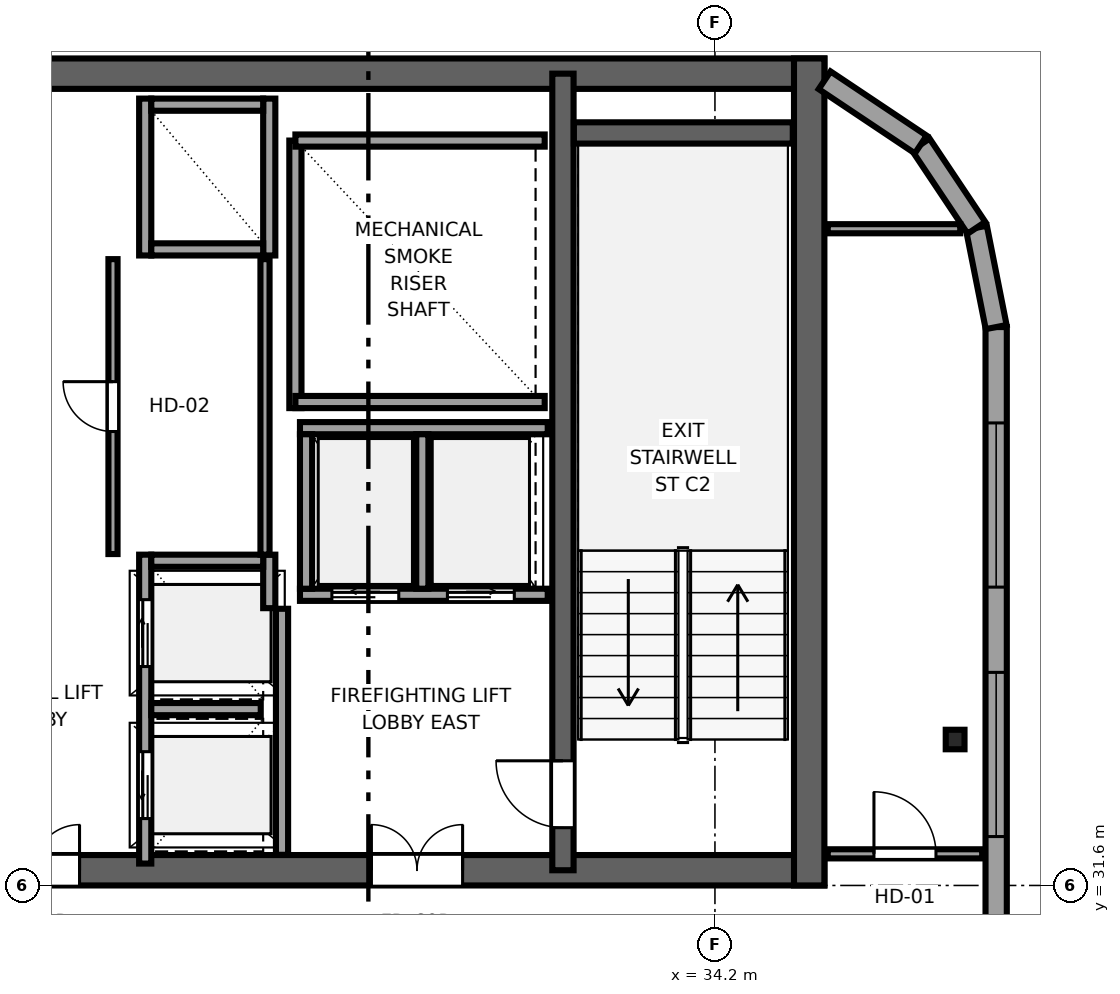
"""IFC4 building model, lengths in metres.
Left out: names, types, materials, properties, quantities, classifications, styles, units other than length and angle.
Written with IfcOpenShell. Run it as: python <this file> out.ifc"""

import sys

from ifc_helpers import new_model, si_unit, direction, frame, frame_2d, origin, origin_2d, place, context, subcontext, project, spatial, rectangle, i_section, extrude, source, transform, mapped, element, fill, save


model = new_model("IFC4")
c1 = context("Model", 3, precision=1e-05, world=origin(), true_north=direction((0.0, 1.0)))
c2 = subcontext(c1, "Body", "Model", "MODEL_VIEW")
j1 = project(units=[si_unit("LENGTHUNIT", "METRE"), si_unit("PLANEANGLEUNIT", "RADIAN")], contexts=[c1])
p1 = place(None, origin())
s1 = spatial("IfcSite", under=j1, at=p1, CompositionType="ELEMENT")
p2 = place(p1, origin())
s2 = spatial("IfcBuilding", under=s1, at=p2, CompositionType="ELEMENT")
p3 = place(p2, frame((0.0, 0.0, 248.75)))
s3 = spatial("IfcBuildingStorey", under=s2, at=p3, CompositionType="ELEMENT", Elevation=248.75)
p4 = place(p3, frame((10.0, 31.85, 0.0), z_axis=(0.0, 0.0, 1.0), x_axis=(1.0, 0.0, 0.0)))
e1 = element("IfcWall", 1, at=p4, inside=s3, PredefinedType="SHEAR", context=c2, shape_type="SweptSolid", body=[
    extrude(rectangle(XDim=26.0, YDim=0.5, at=frame_2d((13.0, 0.0))), origin(), (0.0, 0.0, 1.0), 3.55),
])
p5 = place(p4, frame((7.45, 0.0, 0.0), z_axis=(0.0, 0.0, 1.0), x_axis=(-1.0, 0.0, 0.0)))
e2 = element("IfcOpeningElement", 2, at=p5, cuts=e1, PredefinedType="OPENING", context=c2, shape_type="SweptSolid", body=[
    extrude(rectangle(XDim=1.5, YDim=2.04, at=frame_2d((0.75, 1.02))), frame((0.0, 0.26, 0.0), z_axis=(0.0, -1.0, 0.0), x_axis=(1.0, 0.0, 0.0)), (0.0, 0.0, 1.0), 0.52),
])
p6 = place(p4, frame((13.75, 0.0, 0.0), z_axis=(0.0, 0.0, 1.0), x_axis=(-1.0, 0.0, 0.0)))
e3 = element("IfcOpeningElement", 3, at=p6, cuts=e1, PredefinedType="OPENING", context=c2, shape_type="SweptSolid", body=[
    extrude(rectangle(XDim=1.5, YDim=2.04, at=frame_2d((0.75, 1.02))), frame((0.0, 0.26, 0.0), z_axis=(0.0, -1.0, 0.0), x_axis=(1.0, 0.0, 0.0)), (0.0, 0.0, 1.0), 0.52),
])
p7 = place(p4, frame((20.05, 0.0, 0.0), z_axis=(0.0, 0.0, 1.0), x_axis=(-1.0, 0.0, 0.0)))
e4 = element("IfcOpeningElement", 4, at=p7, cuts=e1, PredefinedType="OPENING", context=c2, shape_type="SweptSolid", body=[
    extrude(rectangle(XDim=1.5, YDim=2.04, at=frame_2d((0.75, 1.02))), frame((0.0, 0.26, 0.0), z_axis=(0.0, -1.0, 0.0), x_axis=(1.0, 0.0, 0.0)), (0.0, 0.0, 1.0), 0.52),
])
p8 = place(p3, frame((10.0, 44.95, 0.0), z_axis=(0.0, 0.0, 1.0), x_axis=(1.0, 0.0, 0.0)))
e5 = element("IfcWall", 5, at=p8, inside=s3, PredefinedType="SHEAR", context=c2, shape_type="SweptSolid", body=[
    extrude(rectangle(XDim=26.0, YDim=0.5, at=frame_2d((13.0, 0.0))), origin(), (0.0, 0.0, 1.0), 3.55),
])
p9 = place(p3, frame((35.75, 31.6, 0.0), z_axis=(0.0, 0.0, 1.0), x_axis=(0.0, 1.0, 0.0)))
e6 = element("IfcWall", 6, at=p9, inside=s3, PredefinedType="SHEAR", context=c2, shape_type="SweptSolid", body=[
    extrude(rectangle(XDim=13.6, YDim=0.5, at=frame_2d((6.8, 0.0))), origin(), (0.0, 0.0, 1.0), 3.55),
])
p10 = place(p3, frame((31.7, 31.85, 0.0), z_axis=(0.0, 0.0, 1.0), x_axis=(0.0, 1.0, 0.0)))
e7 = element("IfcWall", 7, at=p10, inside=s3, PredefinedType="SHEAR", context=c2, shape_type="SweptSolid", body=[
    extrude(rectangle(XDim=13.1, YDim=0.35, at=frame_2d((6.55, 0.0))), origin(), (0.0, 0.0, 1.0), 3.55),
])
p11 = place(p10, frame((1.8, 0.0, 0.0), z_axis=(0.0, 0.0, 1.0), x_axis=(-1.0, 0.0, 0.0)))
e8 = element("IfcOpeningElement", 8, at=p11, cuts=e7, PredefinedType="OPENING", context=c2, shape_type="SweptSolid", body=[
    extrude(rectangle(XDim=1.1, YDim=2.12, at=frame_2d((0.55, 1.06))), frame((0.0, 0.185, 0.0), z_axis=(0.0, -1.0, 0.0), x_axis=(1.0, 0.0, 0.0)), (0.0, 0.0, 1.0), 0.37),
])
p12 = place(p3, frame((31.88, 43.975, 0.0), z_axis=(0.0, 0.0, 1.0), x_axis=(1.0, 0.0, 0.0)))
e9 = element("IfcWall", 9, at=p12, inside=s3, PredefinedType="SHEAR", context=c2, shape_type="SweptSolid", body=[
    extrude(rectangle(XDim=3.6, YDim=0.35, at=frame_2d((1.8, 0.0))), origin(), (0.0, 0.0, 1.0), 3.55),
])
m1 = source(origin(), c2, "Body", "SweptSolid", [
    extrude(i_section(OverallWidth=0.309, OverallDepth=0.321, WebThickness=0.014, FlangeThickness=0.022, FilletRadius=0.017, at=origin_2d()), origin(), (0.0, 0.0, 1.0), 3.55),
])
p13 = place(p3, frame((38.15, 34.0, 0.0), z_axis=(0.0, 0.0, 1.0), x_axis=(1.0, 0.0, 0.0)))
e10 = element("IfcColumn", 10, at=p13, inside=s3, PredefinedType="COLUMN", context=c2, shape_type="MappedRepresentation", body=[
    mapped(m1, transform((0.0, 0.0, 0.0), x_axis=(1.0, 0.0, 0.0), y_axis=(0.0, 1.0, 0.0), z_axis=(0.0, 0.0, 1.0), scale=1.0)),
])
p14 = place(p3, frame((38.825, 7.017, 0.0), z_axis=(0.0, 0.0, 1.0), x_axis=(0.0, 1.0, 0.0)))
e11 = element("IfcWall", 11, at=p14, inside=s3, PredefinedType="SOLIDWALL", context=c2, shape_type="SweptSolid", body=[
    extrude(rectangle(XDim=33.766, YDim=0.35, at=frame_2d((16.883, 0.0))), origin(), (0.0, 0.0, 1.0), 3.37),
])
p15 = place(p14, frame((1.576, 0.0, 0.68)))
e12 = element("IfcOpeningElement", 12, at=p15, cuts=e11, PredefinedType="OPENING", context=c2, shape_type="SweptSolid", body=[
    extrude(rectangle(XDim=2.7, YDim=1.95, at=frame_2d((1.35, 0.975))), frame((0.0, 0.185, 0.0), z_axis=(0.0, -1.0, 0.0), x_axis=(1.0, 0.0, 0.0)), (0.0, 0.0, 1.0), 0.37),
])
p16 = place(p14, frame((6.228, 0.0, 0.68)))
e13 = element("IfcOpeningElement", 13, at=p16, cuts=e11, PredefinedType="OPENING", context=c2, shape_type="SweptSolid", body=[
    extrude(rectangle(XDim=2.7, YDim=1.95, at=frame_2d((1.35, 0.975))), frame((0.0, 0.185, 0.0), z_axis=(0.0, -1.0, 0.0), x_axis=(1.0, 0.0, 0.0)), (0.0, 0.0, 1.0), 0.37),
])
p17 = place(p14, frame((10.881, 0.0, 0.68)))
e14 = element("IfcOpeningElement", 14, at=p17, cuts=e11, PredefinedType="OPENING", context=c2, shape_type="SweptSolid", body=[
    extrude(rectangle(XDim=2.7, YDim=1.95, at=frame_2d((1.35, 0.975))), frame((0.0, 0.185, 0.0), z_axis=(0.0, -1.0, 0.0), x_axis=(1.0, 0.0, 0.0)), (0.0, 0.0, 1.0), 0.37),
])
p18 = place(p14, frame((15.533, 0.0, 0.68)))
e15 = element("IfcOpeningElement", 15, at=p18, cuts=e11, PredefinedType="OPENING", context=c2, shape_type="SweptSolid", body=[
    extrude(rectangle(XDim=2.7, YDim=1.95, at=frame_2d((1.35, 0.975))), frame((0.0, 0.185, 0.0), z_axis=(0.0, -1.0, 0.0), x_axis=(1.0, 0.0, 0.0)), (0.0, 0.0, 1.0), 0.37),
])
p19 = place(p14, frame((19.635, 0.0, 0.68)))
e16 = element("IfcOpeningElement", 16, at=p19, cuts=e11, PredefinedType="OPENING", context=c2, shape_type="SweptSolid", body=[
    extrude(rectangle(XDim=2.7, YDim=1.95, at=frame_2d((1.35, 0.975))), frame((0.0, 0.185, 0.0), z_axis=(0.0, -1.0, 0.0), x_axis=(1.0, 0.0, 0.0)), (0.0, 0.0, 1.0), 0.37),
])
p20 = place(p14, frame((25.387, 0.0, 0.68)))
e17 = element("IfcOpeningElement", 17, at=p20, cuts=e11, PredefinedType="OPENING", context=c2, shape_type="SweptSolid", body=[
    extrude(rectangle(XDim=2.7, YDim=1.95, at=frame_2d((1.35, 0.975))), frame((0.0, 0.185, 0.0), z_axis=(0.0, -1.0, 0.0), x_axis=(1.0, 0.0, 0.0)), (0.0, 0.0, 1.0), 0.37),
])
p21 = place(p14, frame((29.489, 0.0, 0.68)))
e18 = element("IfcOpeningElement", 18, at=p21, cuts=e11, PredefinedType="OPENING", context=c2, shape_type="SweptSolid", body=[
    extrude(rectangle(XDim=2.7, YDim=1.95, at=frame_2d((1.35, 0.975))), frame((0.0, 0.185, 0.0), z_axis=(0.0, -1.0, 0.0), x_axis=(1.0, 0.0, 0.0)), (0.0, 0.0, 1.0), 0.37),
])
p22 = place(p3, frame((38.825, 40.783, 0.0), z_axis=(0.0, 0.0, 1.0), x_axis=(-0.195044345786, 0.980794424524, 0.0)))
e19 = element("IfcWall", 19, at=p22, inside=s3, PredefinedType="SOLIDWALL", context=c2, shape_type="SweptSolid", body=[
    extrude(rectangle(XDim=1.665, YDim=0.35, at=frame_2d((0.833, 0.0))), origin(), (0.0, 0.0, 1.0), 3.37),
])
p23 = place(p3, frame((38.5, 42.416, 0.0), z_axis=(0.0, 0.0, 1.0), x_axis=(-0.555520825599, 0.831502623162, 0.0)))
e20 = element("IfcWall", 20, at=p23, inside=s3, PredefinedType="SOLIDWALL", context=c2, shape_type="SweptSolid", body=[
    extrude(rectangle(XDim=1.647, YDim=0.35, at=frame_2d((0.824, 0.0))), origin(), (0.0, 0.0, 1.0), 3.37),
])
p24 = place(p3, frame((37.585, 43.785, 0.0), z_axis=(0.0, 0.0, 1.0), x_axis=(-0.831516639465, 0.555499845448, 0.0)))
e21 = element("IfcWall", 21, at=p24, inside=s3, PredefinedType="SOLIDWALL", context=c2, shape_type="SweptSolid", body=[
    extrude(rectangle(XDim=1.902, YDim=0.35, at=frame_2d((0.951, 0.0))), origin(), (0.0, 0.0, 1.0), 3.37),
])
p25 = place(p3, frame((27.3, 39.45, 0.0), z_axis=(0.0, 0.0, 1.0), x_axis=(0.0, 1.0, 0.0)))
e22 = element("IfcWall", 22, at=p25, inside=s3, PredefinedType="SOLIDWALL", context=c2, shape_type="SweptSolid", body=[
    extrude(rectangle(XDim=4.4, YDim=0.2, at=frame_2d((2.2, 0.0))), origin(), (0.0, 0.0, 1.0), 3.37),
])
for number, where, z_axis, x_axis in (
    (23, (27.3, 39.55, 0.0), (0.0, 0.0, 1.0), (1.0, 0.0, 0.0)),
    (24, (27.3, 43.85, 0.0), (0.0, 0.0, 1.0), (1.0, 0.0, 0.0)),
):
    element("IfcWall", number, at=place(p3, frame(where, z_axis=z_axis, x_axis=x_axis)), inside=s3, PredefinedType="SOLIDWALL", context=c2, shape_type="SweptSolid", body=[
        extrude(rectangle(XDim=4.1, YDim=0.2, at=frame_2d((2.05, 0.0))), origin(), (0.0, 0.0, 1.0), 3.37),
    ])
p26 = place(p3, frame((27.08, 32.104, 0.0), z_axis=(0.0, 0.0, 1.0), x_axis=(0.0, 1.0, 0.0)))
e25 = element("IfcWall", 25, at=p26, inside=s3, PredefinedType="SOLIDWALL", context=c2, shape_type="SweptSolid", body=[
    extrude(rectangle(XDim=4.046, YDim=0.2, at=frame_2d((2.023, 0.0))), origin(), (0.0, 0.0, 1.0), 3.37),
])
p27 = place(p3, frame((27.375, 36.38, 0.0), z_axis=(0.0, 0.0, 1.0), x_axis=(1.0, 0.0, 0.0)))
e26 = element("IfcWall", 26, at=p27, inside=s3, PredefinedType="SOLIDWALL", context=c2, shape_type="SweptSolid", body=[
    extrude(rectangle(XDim=4.075, YDim=0.2, at=frame_2d((2.038, 0.0))), origin(), (0.0, 0.0, 1.0), 3.37),
])
p28 = place(p27, frame((0.525, 0.0, 0.0)))
e27 = element("IfcOpeningElement", 27, at=p28, cuts=e26, PredefinedType="OPENING", context=c2, shape_type="SweptSolid", body=[
    extrude(rectangle(XDim=1.1, YDim=2.12, at=frame_2d((0.55, 1.06))), frame((0.0, 0.11, 0.0), z_axis=(0.0, -1.0, 0.0), x_axis=(1.0, 0.0, 0.0)), (0.0, 0.0, 1.0), 0.22),
])
p29 = place(p27, frame((2.425, 0.0, 0.0)))
e28 = element("IfcOpeningElement", 28, at=p29, cuts=e26, PredefinedType="OPENING", context=c2, shape_type="SweptSolid", body=[
    extrude(rectangle(XDim=1.1, YDim=2.12, at=frame_2d((0.55, 1.06))), frame((0.0, 0.11, 0.0), z_axis=(0.0, -1.0, 0.0), x_axis=(1.0, 0.0, 0.0)), (0.0, 0.0, 1.0), 0.22),
])
p30 = place(p3, frame((27.375, 39.12, 0.0), z_axis=(0.0, 0.0, 1.0), x_axis=(1.0, 0.0, 0.0)))
e29 = element("IfcWall", 29, at=p30, inside=s3, PredefinedType="SOLIDWALL", context=c2, shape_type="SweptSolid", body=[
    extrude(rectangle(XDim=4.075, YDim=0.2, at=frame_2d((2.038, 0.0))), origin(), (0.0, 0.0, 1.0), 3.37),
])
for number, where, z_axis, x_axis in (
    (30, (27.475, 36.48, 0.0), (0.0, 0.0, 1.0), (0.0, 1.0, 0.0)),
    (31, (29.387, 36.48, 0.0), (0.0, 0.0, 1.0), (0.0, 1.0, 0.0)),
):
    element("IfcWall", number, at=place(p3, frame(where, z_axis=z_axis, x_axis=x_axis)), inside=s3, PredefinedType="SOLIDWALL", context=c2, shape_type="SweptSolid", body=[
        extrude(rectangle(XDim=2.54, YDim=0.2, at=frame_2d((1.27, 0.0))), origin(), (0.0, 0.0, 1.0), 3.37),
    ])
p31 = place(p3, frame((24.83, 31.96, 0.0), z_axis=(0.0, 0.0, 1.0), x_axis=(0.0, 1.0, 0.0)))
e32 = element("IfcWall", 32, at=p31, inside=s3, PredefinedType="SOLIDWALL", context=c2, shape_type="SweptSolid", body=[
    extrude(rectangle(XDim=5.08, YDim=0.2, at=frame_2d((2.54, 0.0))), origin(), (0.0, 0.0, 1.0), 3.37),
])
p32 = place(p31, frame((0.74, 0.0, 0.0)))
e33 = element("IfcOpeningElement", 33, at=p32, cuts=e32, PredefinedType="OPENING", context=c2, shape_type="SweptSolid", body=[
    extrude(rectangle(XDim=1.1, YDim=2.12, at=frame_2d((0.55, 1.06))), frame((0.0, 0.11, 0.0), z_axis=(0.0, -1.0, 0.0), x_axis=(1.0, 0.0, 0.0)), (0.0, 0.0, 1.0), 0.22),
])
p33 = place(p31, frame((3.24, 0.0, 0.0)))
e34 = element("IfcOpeningElement", 34, at=p33, cuts=e32, PredefinedType="OPENING", context=c2, shape_type="SweptSolid", body=[
    extrude(rectangle(XDim=1.1, YDim=2.12, at=frame_2d((0.55, 1.06))), frame((0.0, 0.11, 0.0), z_axis=(0.0, -1.0, 0.0), x_axis=(1.0, 0.0, 0.0)), (0.0, 0.0, 1.0), 0.22),
])
p34 = place(p3, frame((26.87, 36.16, 0.0), z_axis=(0.0, 0.0, 1.0), x_axis=(0.0, 1.0, 0.0)))
e35 = element("IfcWall", 35, at=p34, inside=s3, PredefinedType="SOLIDWALL", context=c2, shape_type="SweptSolid", body=[
    extrude(rectangle(XDim=0.88, YDim=0.2, at=frame_2d((0.44, 0.0))), origin(), (0.0, 0.0, 1.0), 3.37),
])
p35 = place(p3, frame((24.93, 36.94, 0.0), z_axis=(0.0, 0.0, 1.0), x_axis=(1.0, 0.0, 0.0)))
e36 = element("IfcWall", 36, at=p35, inside=s3, PredefinedType="SOLIDWALL", context=c2, shape_type="SweptSolid", body=[
    extrude(rectangle(XDim=1.84, YDim=0.2, at=frame_2d((0.92, 0.0))), origin(), (0.0, 0.0, 1.0), 3.37),
])
p36 = place(p3, frame((24.93, 34.5, 0.0), z_axis=(0.0, 0.0, 1.0), x_axis=(1.0, 0.0, 0.0)))
e37 = element("IfcWall", 37, at=p36, inside=s3, PredefinedType="SOLIDWALL", context=c2, shape_type="SweptSolid", body=[
    extrude(rectangle(XDim=1.8, YDim=0.2, at=frame_2d((0.9, 0.0))), origin(), (0.0, 0.0, 1.0), 3.37),
])
for number, where, z_axis, x_axis in (
    (38, (24.83, 41.96, 0.0), (0.0, 0.0, 1.0), (0.0, 1.0, 0.0)),
    (39, (26.87, 41.96, 0.0), (0.0, 0.0, 1.0), (0.0, 1.0, 0.0)),
):
    element("IfcWall", number, at=place(p3, frame(where, z_axis=z_axis, x_axis=x_axis)), inside=s3, PredefinedType="SOLIDWALL", context=c2, shape_type="SweptSolid", body=[
        extrude(rectangle(XDim=2.58, YDim=0.2, at=frame_2d((1.29, 0.0))), origin(), (0.0, 0.0, 1.0), 3.37),
    ])
for number, where, z_axis, x_axis in (
    (40, (24.93, 42.06, 0.0), (0.0, 0.0, 1.0), (1.0, 0.0, 0.0)),
    (41, (24.93, 44.44, 0.0), (0.0, 0.0, 1.0), (1.0, 0.0, 0.0)),
):
    element("IfcWall", number, at=place(p3, frame(where, z_axis=z_axis, x_axis=x_axis)), inside=s3, PredefinedType="SOLIDWALL", context=c2, shape_type="SweptSolid", body=[
        extrude(rectangle(XDim=1.84, YDim=0.2, at=frame_2d((0.92, 0.0))), origin(), (0.0, 0.0, 1.0), 3.37),
    ])
p37 = place(p3, frame((24.3, 37.05, 0.0), z_axis=(0.0, 0.0, 1.0), x_axis=(0.0, 1.0, 0.0)))
e42 = element("IfcWall", 42, at=p37, inside=s3, PredefinedType="PARTITIONING", context=c2, shape_type="SweptSolid", body=[
    extrude(rectangle(XDim=4.85, YDim=0.15, at=frame_2d((2.425, 0.0))), origin(), (0.0, 0.0, 1.0), 3.37),
])
p38 = place(p37, frame((2.015, 0.0, 0.0)))
e43 = element("IfcOpeningElement", 43, at=p38, cuts=e42, PredefinedType="OPENING", context=c2, shape_type="SweptSolid", body=[
    extrude(rectangle(XDim=0.82, YDim=2.01, at=frame_2d((0.41, 1.005))), frame((0.0, 0.085, 0.0), z_axis=(0.0, -1.0, 0.0), x_axis=(1.0, 0.0, 0.0)), (0.0, 0.0, 1.0), 0.17),
])
p39 = place(p3, frame((26.8, 37.04, 0.0), z_axis=(0.0, 0.0, 1.0), x_axis=(0.0, 1.0, 0.0)))
e44 = element("IfcWall", 44, at=p39, inside=s3, PredefinedType="PARTITIONING", context=c2, shape_type="SweptSolid", body=[
    extrude(rectangle(XDim=4.86, YDim=0.15, at=frame_2d((2.43, 0.0))), origin(), (0.0, 0.0, 1.0), 3.37),
])
p40 = place(p3, frame((36.055, 32.12, 0.0), z_axis=(0.0, 0.0, 1.0), x_axis=(1.0, 0.0, 0.0)))
e45 = element("IfcWall", 45, at=p40, inside=s3, PredefinedType="PARTITIONING", context=c2, shape_type="SweptSolid", body=[
    extrude(rectangle(XDim=2.54, YDim=0.15, at=frame_2d((1.27, 0.0))), origin(), (0.0, 0.0, 1.0), 3.37),
])
p41 = place(p40, frame((0.76, 0.0, 0.0)))
e46 = element("IfcOpeningElement", 46, at=p41, cuts=e45, PredefinedType="OPENING", context=c2, shape_type="SweptSolid", body=[
    extrude(rectangle(XDim=1.02, YDim=2.03, at=frame_2d((0.51, 1.015))), frame((0.0, 0.085, 0.0), z_axis=(0.0, -1.0, 0.0), x_axis=(1.0, 0.0, 0.0)), (0.0, 0.0, 1.0), 0.17),
])
p42 = place(p3, frame((36.055, 42.4, 0.0), z_axis=(0.0, 0.0, 1.0), x_axis=(1.0, 0.0, 0.0)))
e47 = element("IfcWall", 47, at=p42, inside=s3, PredefinedType="PARTITIONING", context=c2, shape_type="SweptSolid", body=[
    extrude(rectangle(XDim=2.179, YDim=0.15, at=frame_2d((1.089, 0.0))), origin(), (0.0, 0.0, 1.0), 3.37),
])
m2 = source(origin(), c2, "Body", "SweptSolid", [
    extrude(rectangle(XDim=2.7, YDim=1.95, at=frame_2d((1.35, 0.975))), frame((0.0, 0.09, 0.0), z_axis=(0.0, -1.0, 0.0), x_axis=(1.0, 0.0, 0.0)), (0.0, 0.0, 1.0), 0.06),
])
p43 = place(p20, origin())
e48 = element("IfcWindow", 48, at=p43, inside=s3, PartitioningType="TRIPLE_PANEL_HORIZONTAL", PredefinedType="WINDOW", context=c2, shape_type="MappedRepresentation", body=[
    mapped(m2, transform((0.0, 0.0, 0.0), x_axis=(1.0, 0.0, 0.0), y_axis=(0.0, 1.0, 0.0), z_axis=(0.0, 0.0, 1.0), scale=1.0)),
])
fill(e17, e48)
p44 = place(p21, origin())
e49 = element("IfcWindow", 49, at=p44, inside=s3, PartitioningType="TRIPLE_PANEL_HORIZONTAL", PredefinedType="WINDOW", context=c2, shape_type="MappedRepresentation", body=[
    mapped(m2, transform((0.0, 0.0, 0.0), x_axis=(1.0, 0.0, 0.0), y_axis=(0.0, 1.0, 0.0), z_axis=(0.0, 0.0, 1.0), scale=1.0)),
])
fill(e18, e49)
m3 = source(origin(), c2, "Body", "SweptSolid", [
    extrude(rectangle(XDim=1.1, YDim=2.12, at=frame_2d((0.55, 1.06))), frame((0.0, 0.025, 0.0), z_axis=(0.0, -1.0, 0.0), x_axis=(1.0, 0.0, 0.0)), (0.0, 0.0, 1.0), 0.05),
])
p45 = place(p11, origin())
e50 = element("IfcDoor", 50, at=p45, inside=s3, OperationType="SINGLE_SWING_RIGHT", PredefinedType="DOOR", context=c2, shape_type="MappedRepresentation", body=[
    mapped(m3, transform((0.0, 0.0, 0.0), x_axis=(1.0, 0.0, 0.0), y_axis=(0.0, 1.0, 0.0), z_axis=(0.0, 0.0, 1.0), scale=1.0)),
])
fill(e8, e50)
m4 = source(origin(), c2, "Body", "SweptSolid", [
    extrude(rectangle(XDim=1.5, YDim=2.04, at=frame_2d((0.75, 1.02))), frame((0.0, 0.025, 0.0), z_axis=(0.0, -1.0, 0.0), x_axis=(1.0, 0.0, 0.0)), (0.0, 0.0, 1.0), 0.05),
])
p46 = place(p6, origin())
e51 = element("IfcDoor", 51, at=p46, inside=s3, OperationType="DOUBLE_DOOR_SINGLE_SWING", PredefinedType="DOOR", context=c2, shape_type="MappedRepresentation", body=[
    mapped(m4, transform((0.0, 0.0, 0.0), x_axis=(1.0, 0.0, 0.0), y_axis=(0.0, 1.0, 0.0), z_axis=(0.0, 0.0, 1.0), scale=1.0)),
])
fill(e3, e51)
p47 = place(p7, origin())
e52 = element("IfcDoor", 52, at=p47, inside=s3, OperationType="DOUBLE_DOOR_SINGLE_SWING", PredefinedType="DOOR", context=c2, shape_type="MappedRepresentation", body=[
    mapped(m4, transform((0.0, 0.0, 0.0), x_axis=(1.0, 0.0, 0.0), y_axis=(0.0, 1.0, 0.0), z_axis=(0.0, 0.0, 1.0), scale=1.0)),
])
fill(e4, e52)
m5 = source(origin(), c2, "Body", "SweptSolid", [
    extrude(rectangle(XDim=1.1, YDim=2.12, at=frame_2d((0.55, 1.06))), frame((0.0, 0.025, 0.0), z_axis=(0.0, -1.0, 0.0), x_axis=(1.0, 0.0, 0.0)), (0.0, 0.0, 1.0), 0.05),
])
p48 = place(p28, origin())
e53 = element("IfcDoor", 53, at=p48, inside=s3, OperationType="SLIDING_TO_LEFT", PredefinedType="DOOR", context=c2, shape_type="MappedRepresentation", body=[
    mapped(m5, transform((0.0, 0.0, 0.0), x_axis=(1.0, 0.0, 0.0), y_axis=(0.0, 1.0, 0.0), z_axis=(0.0, 0.0, 1.0), scale=1.0)),
])
fill(e27, e53)
p49 = place(p29, origin())
e54 = element("IfcDoor", 54, at=p49, inside=s3, OperationType="SLIDING_TO_RIGHT", PredefinedType="DOOR", context=c2, shape_type="MappedRepresentation", body=[
    mapped(m5, transform((0.0, 0.0, 0.0), x_axis=(1.0, 0.0, 0.0), y_axis=(0.0, 1.0, 0.0), z_axis=(0.0, 0.0, 1.0), scale=1.0)),
])
fill(e28, e54)
p50 = place(p32, origin())
e55 = element("IfcDoor", 55, at=p50, inside=s3, OperationType="SLIDING_TO_LEFT", PredefinedType="DOOR", context=c2, shape_type="MappedRepresentation", body=[
    mapped(m5, transform((0.0, 0.0, 0.0), x_axis=(1.0, 0.0, 0.0), y_axis=(0.0, 1.0, 0.0), z_axis=(0.0, 0.0, 1.0), scale=1.0)),
])
fill(e33, e55)
p51 = place(p33, origin())
e56 = element("IfcDoor", 56, at=p51, inside=s3, OperationType="SLIDING_TO_RIGHT", PredefinedType="DOOR", context=c2, shape_type="MappedRepresentation", body=[
    mapped(m5, transform((0.0, 0.0, 0.0), x_axis=(1.0, 0.0, 0.0), y_axis=(0.0, 1.0, 0.0), z_axis=(0.0, 0.0, 1.0), scale=1.0)),
])
fill(e34, e56)
m6 = source(origin(), c2, "Body", "SweptSolid", [
    extrude(rectangle(XDim=0.82, YDim=2.01, at=frame_2d((0.41, 1.005))), frame((0.0, 0.025, 0.0), z_axis=(0.0, -1.0, 0.0), x_axis=(1.0, 0.0, 0.0)), (0.0, 0.0, 1.0), 0.05),
])
p52 = place(p38, origin())
e57 = element("IfcDoor", 57, at=p52, inside=s3, OperationType="SINGLE_SWING_RIGHT", PredefinedType="DOOR", context=c2, shape_type="MappedRepresentation", body=[
    mapped(m6, transform((0.0, 0.0, 0.0), x_axis=(1.0, 0.0, 0.0), y_axis=(0.0, 1.0, 0.0), z_axis=(0.0, 0.0, 1.0), scale=1.0)),
])
fill(e43, e57)
m7 = source(origin(), c2, "Body", "SweptSolid", [
    extrude(rectangle(XDim=1.02, YDim=2.03, at=frame_2d((0.51, 1.015))), frame((0.0, 0.025, 0.0), z_axis=(0.0, -1.0, 0.0), x_axis=(1.0, 0.0, 0.0)), (0.0, 0.0, 1.0), 0.05),
])
p53 = place(p41, origin())
e58 = element("IfcDoor", 58, at=p53, inside=s3, OperationType="SINGLE_SWING_LEFT", PredefinedType="DOOR", context=c2, shape_type="MappedRepresentation", body=[
    mapped(m7, transform((0.0, 0.0, 0.0), x_axis=(1.0, 0.0, 0.0), y_axis=(0.0, 1.0, 0.0), z_axis=(0.0, 0.0, 1.0), scale=1.0)),
])
fill(e46, e58)
save(model, sys.argv[1])
